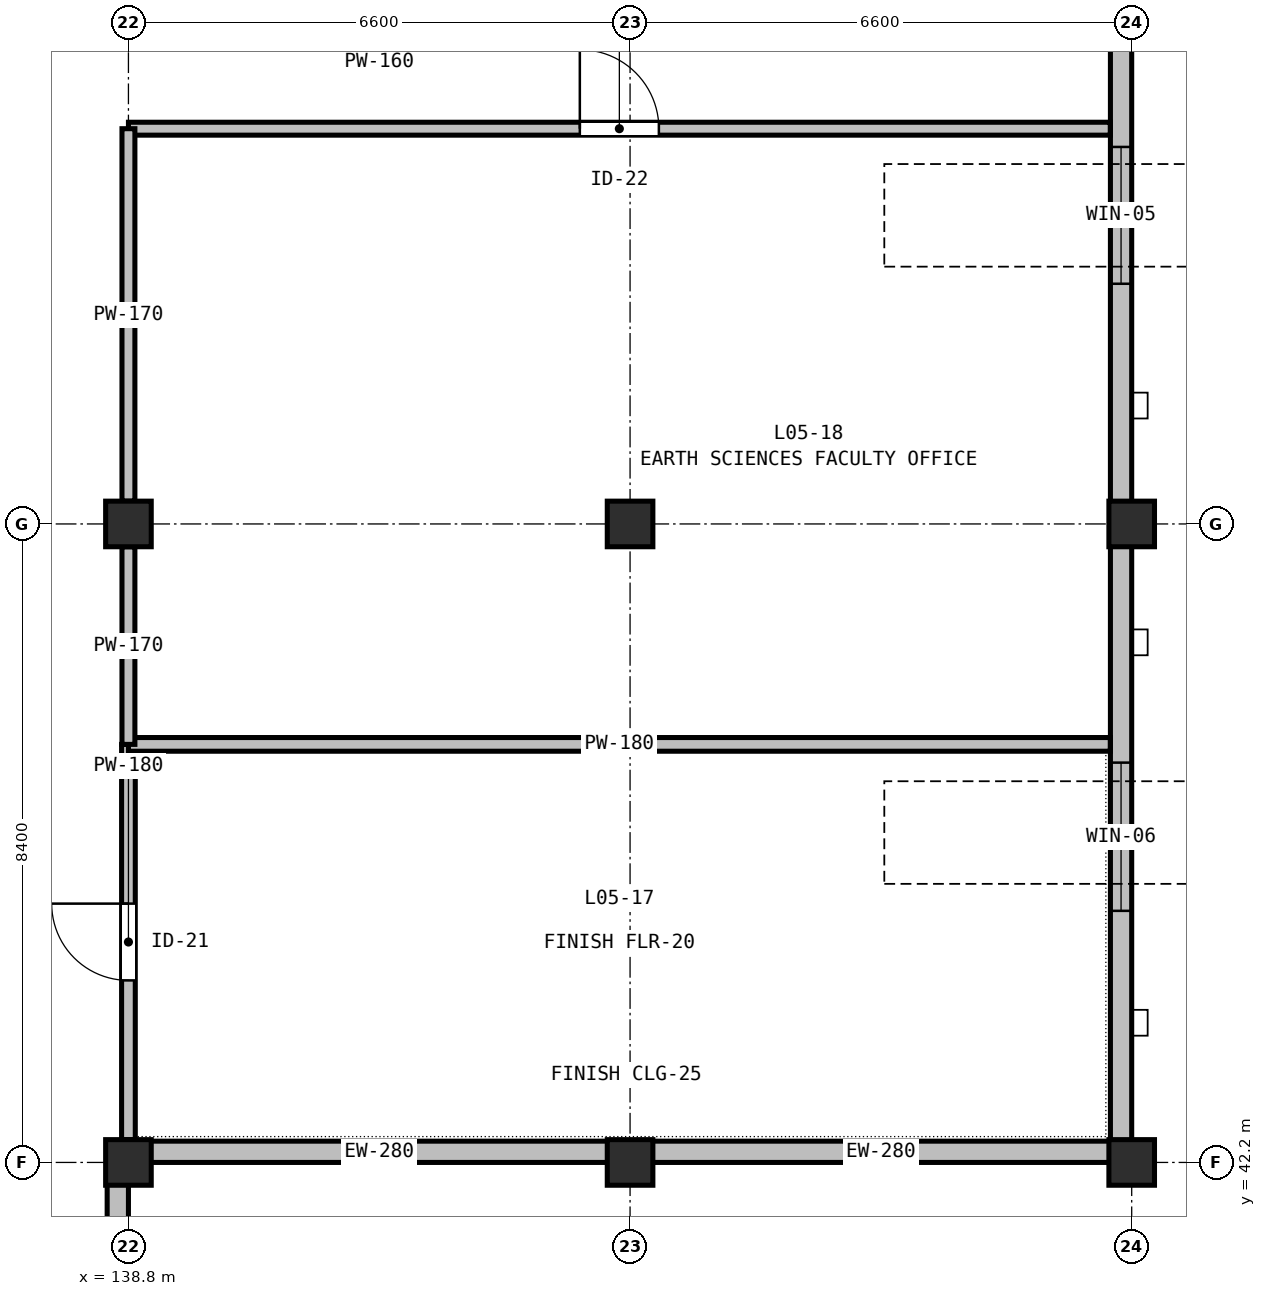
"""IFC4 building model, lengths in metres.
Left out: names, types, materials, properties, quantities, classifications, styles, units other than length and angle.
Written with IfcOpenShell. Run it as: python <this file> out.ifc"""

import sys

from ifc_helpers import new_model, si_unit, direction, frame, frame_2d, origin, origin_2d, place, context, subcontext, project, spatial, rectangle, extrude, element, fill, save


model = new_model("IFC4")
c1 = context("Model", 3, precision=1e-05, world=origin(), true_north=direction((0.0, 1.0)))
c2 = subcontext(c1, "Body", "Model", "MODEL_VIEW")
j1 = project(units=[si_unit("LENGTHUNIT", "METRE"), si_unit("PLANEANGLEUNIT", "RADIAN")], contexts=[c1])
p1 = place(None, origin())
s1 = spatial("IfcSite", under=j1, at=p1, CompositionType="ELEMENT")
p2 = place(p1, origin())
s2 = spatial("IfcBuilding", under=s1, at=p2, CompositionType="ELEMENT")
p3 = place(p2, frame((0.0, 0.0, 24.0)))
s3 = spatial("IfcBuildingStorey", under=s2, at=p3, CompositionType="ELEMENT", Elevation=24.0)
for number, where, z_axis, x_axis in (
    (1, (138.8, 42.2, 0.0), (0.0, 0.0, 1.0), (1.0, 0.0, 0.0)),
    (2, (138.8, 50.6, 0.0), (0.0, 0.0, 1.0), (1.0, 0.0, 0.0)),
    (3, (145.4, 42.2, 0.0), (0.0, 0.0, 1.0), (1.0, 0.0, 0.0)),
    (4, (145.4, 50.6, 0.0), (0.0, 0.0, 1.0), (1.0, 0.0, 0.0)),
    (5, (152.0, 42.2, 0.0), (0.0, 0.0, 1.0), (1.0, 0.0, 0.0)),
    (6, (152.0, 50.6, 0.0), (0.0, 0.0, 1.0), (1.0, 0.0, 0.0)),
):
    element("IfcColumn", number, at=place(p3, frame(where, z_axis=z_axis, x_axis=x_axis)), inside=s3, PredefinedType="COLUMN", context=c2, shape_type="SweptSolid", body=[
        extrude(rectangle(XDim=0.6, YDim=0.6, at=origin_2d()), origin(), (0.0, 0.0, 1.0), 4.5),
    ])
p4 = place(p3, frame((151.86, 58.72, 0.0), z_axis=(0.0, 0.0, 1.0), x_axis=(0.0, -1.0, 0.0)))
e7 = element("IfcWall", 7, at=p4, inside=s3, PredefinedType="STANDARD", context=c2, shape_type="SweptSolid", body=[
    extrude(rectangle(XDim=8.12, YDim=0.28, at=frame_2d((4.06, 0.0))), origin(), (0.0, 0.0, 1.0), 3.885),
])
p5 = place(p4, frame((3.16, 0.0, 0.9)))
e8 = element("IfcOpeningElement", 8, at=p5, cuts=e7, PredefinedType="OPENING", context=c2, shape_type="SweptSolid", body=[
    extrude(rectangle(XDim=1.8, YDim=2.1, at=frame_2d((0.9, 1.05))), frame((0.0, 0.15, 0.0), z_axis=(0.0, -1.0, 0.0), x_axis=(1.0, 0.0, 0.0)), (0.0, 0.0, 1.0), 0.3),
])
p6 = place(p3, frame((151.86, 50.6, 0.0), z_axis=(0.0, 0.0, 1.0), x_axis=(0.0, -1.0, 0.0)))
e9 = element("IfcWall", 9, at=p6, inside=s3, PredefinedType="STANDARD", context=c2, shape_type="SweptSolid", body=[
    extrude(rectangle(XDim=8.12, YDim=0.28, at=frame_2d((4.06, 0.0))), origin(), (0.0, 0.0, 1.0), 3.885),
])
p7 = place(p6, frame((3.14, 0.0, 0.9)))
e10 = element("IfcOpeningElement", 10, at=p7, cuts=e9, PredefinedType="OPENING", context=c2, shape_type="SweptSolid", body=[
    extrude(rectangle(XDim=1.95, YDim=2.1, at=frame_2d((0.975, 1.05))), frame((0.0, 0.15, 0.0), z_axis=(0.0, -1.0, 0.0), x_axis=(1.0, 0.0, 0.0)), (0.0, 0.0, 1.0), 0.3),
])
p8 = place(p3, frame((152.0, 42.34, 0.0), z_axis=(0.0, 0.0, 1.0), x_axis=(-1.0, 0.0, 0.0)))
e11 = element("IfcWall", 11, at=p8, inside=s3, PredefinedType="STANDARD", context=c2, shape_type="SweptSolid", body=[
    extrude(rectangle(XDim=6.6, YDim=0.28, at=frame_2d((3.3, 0.0))), origin(), (0.0, 0.0, 1.0), 3.735),
])
p9 = place(p3, frame((145.4, 42.34, 0.0), z_axis=(0.0, 0.0, 1.0), x_axis=(-1.0, 0.0, 0.0)))
e12 = element("IfcWall", 12, at=p9, inside=s3, PredefinedType="STANDARD", context=c2, shape_type="SweptSolid", body=[
    extrude(rectangle(XDim=6.6, YDim=0.28, at=frame_2d((3.3, 0.0))), origin(), (0.0, 0.0, 1.0), 3.735),
])
p10 = place(p3, frame((138.66, 41.92, 0.0), z_axis=(0.0, 0.0, 1.0), x_axis=(0.0, -1.0, 0.0)))
e13 = element("IfcWall", 13, at=p10, inside=s3, PredefinedType="STANDARD", context=c2, shape_type="SweptSolid", body=[
    extrude(rectangle(XDim=7.84, YDim=0.28, at=frame_2d((3.92, 0.0))), origin(), (0.0, 0.0, 1.0), 3.885),
])
p11 = place(p10, frame((0.917, 0.0, 0.9)))
e14 = element("IfcOpeningElement", 14, at=p11, cuts=e13, PredefinedType="OPENING", context=c2, shape_type="SweptSolid", body=[
    extrude(rectangle(XDim=2.4, YDim=2.1, at=frame_2d((1.2, 1.05))), frame((0.0, 0.15, 0.0), z_axis=(0.0, -1.0, 0.0), x_axis=(1.0, 0.0, 0.0)), (0.0, 0.0, 1.0), 0.3),
])
p12 = place(p10, frame((4.523, 0.0, 0.9)))
e15 = element("IfcOpeningElement", 15, at=p12, cuts=e13, PredefinedType="OPENING", context=c2, shape_type="SweptSolid", body=[
    extrude(rectangle(XDim=2.4, YDim=2.1, at=frame_2d((1.2, 1.05))), frame((0.0, 0.15, 0.0), z_axis=(0.0, -1.0, 0.0), x_axis=(1.0, 0.0, 0.0)), (0.0, 0.0, 1.0), 0.3),
])
p13 = place(p3, frame((138.8, 42.5, 0.0), z_axis=(0.0, 0.0, 1.0), x_axis=(0.0, 1.0, 0.0)))
e16 = element("IfcWall", 16, at=p13, inside=s3, PredefinedType="PARTITIONING", context=c2, shape_type="SweptSolid", body=[
    extrude(rectangle(XDim=5.2, YDim=0.18, at=frame_2d((2.6, 0.0))), origin(), (0.0, 0.0, 1.0), 3.735),
])
p14 = place(p13, frame((2.095, 0.0, 0.0)))
e17 = element("IfcOpeningElement", 17, at=p14, cuts=e16, PredefinedType="OPENING", context=c2, shape_type="SweptSolid", body=[
    extrude(rectangle(XDim=1.01, YDim=2.14, at=frame_2d((0.505, 1.07))), frame((0.0, 0.1, 0.0), z_axis=(0.0, -1.0, 0.0), x_axis=(1.0, 0.0, 0.0)), (0.0, 0.0, 1.0), 0.2),
])
p15 = place(p3, frame((138.8, 47.7, 0.0), z_axis=(0.0, 0.0, 1.0), x_axis=(1.0, 0.0, 0.0)))
e18 = element("IfcWall", 18, at=p15, inside=s3, PredefinedType="PARTITIONING", context=c2, shape_type="SweptSolid", body=[
    extrude(rectangle(XDim=12.918, YDim=0.18, at=frame_2d((6.459, 0.0))), origin(), (0.0, 0.0, 1.0), 3.735),
])
p16 = place(p3, frame((138.8, 55.8, 0.0), z_axis=(0.0, 0.0, 1.0), x_axis=(1.0, 0.0, 0.0)))
e19 = element("IfcWall", 19, at=p16, inside=s3, PredefinedType="PARTITIONING", context=c2, shape_type="SweptSolid", body=[
    extrude(rectangle(XDim=12.918, YDim=0.17, at=frame_2d((6.459, 0.0))), origin(), (0.0, 0.0, 1.0), 3.735),
])
p17 = place(p16, frame((5.939, 0.0, 0.0)))
e20 = element("IfcOpeningElement", 20, at=p17, cuts=e19, PredefinedType="OPENING", context=c2, shape_type="SweptSolid", body=[
    extrude(rectangle(XDim=1.04, YDim=2.14, at=frame_2d((0.52, 1.07))), frame((0.0, 0.095, 0.0), z_axis=(0.0, -1.0, 0.0), x_axis=(1.0, 0.0, 0.0)), (0.0, 0.0, 1.0), 0.19),
])
p18 = place(p3, frame((138.8, 47.7, 0.0), z_axis=(0.0, 0.0, 1.0), x_axis=(0.0, 1.0, 0.0)))
e21 = element("IfcWall", 21, at=p18, inside=s3, PredefinedType="PARTITIONING", context=c2, shape_type="SweptSolid", body=[
    extrude(rectangle(XDim=2.6, YDim=0.17, at=frame_2d((1.3, 0.0))), origin(), (0.0, 0.0, 1.0), 3.735),
])
p19 = place(p3, frame((138.8, 50.9, 0.0), z_axis=(0.0, 0.0, 1.0), x_axis=(0.0, 1.0, 0.0)))
e22 = element("IfcWall", 22, at=p19, inside=s3, PredefinedType="PARTITIONING", context=c2, shape_type="SweptSolid", body=[
    extrude(rectangle(XDim=4.9, YDim=0.17, at=frame_2d((2.45, 0.0))), origin(), (0.0, 0.0, 1.0), 3.735),
])
p20 = place(p5, origin())
e23 = element("IfcWindow", 23, at=p20, inside=s3, PartitioningType="SINGLE_PANEL", PredefinedType="WINDOW", context=c2, shape_type="SweptSolid", body=[
    extrude(rectangle(XDim=1.8, YDim=2.1, at=frame_2d((0.9, 1.05))), frame((0.0, 0.03, 0.0), z_axis=(0.0, -1.0, 0.0), x_axis=(1.0, 0.0, 0.0)), (0.0, 0.0, 1.0), 0.06),
])
fill(e8, e23)
p21 = place(p7, origin())
e24 = element("IfcWindow", 24, at=p21, inside=s3, PartitioningType="SINGLE_PANEL", PredefinedType="WINDOW", context=c2, shape_type="SweptSolid", body=[
    extrude(rectangle(XDim=1.95, YDim=2.1, at=frame_2d((0.975, 1.05))), frame((0.0, 0.03, 0.0), z_axis=(0.0, -1.0, 0.0), x_axis=(1.0, 0.0, 0.0)), (0.0, 0.0, 1.0), 0.06),
])
fill(e10, e24)
p22 = place(p14, origin())
e25 = element("IfcDoor", 25, at=p22, inside=s3, OperationType="SINGLE_SWING_RIGHT", PredefinedType="DOOR", context=c2, shape_type="SweptSolid", body=[
    extrude(rectangle(XDim=1.01, YDim=2.14, at=frame_2d((0.505, 1.07))), frame((0.0, 0.025, 0.0), z_axis=(0.0, -1.0, 0.0), x_axis=(1.0, 0.0, 0.0)), (0.0, 0.0, 1.0), 0.05),
])
fill(e17, e25)
p23 = place(p17, origin())
e26 = element("IfcDoor", 26, at=p23, inside=s3, OperationType="SINGLE_SWING_LEFT", PredefinedType="DOOR", context=c2, shape_type="SweptSolid", body=[
    extrude(rectangle(XDim=1.04, YDim=2.14, at=frame_2d((0.52, 1.07))), frame((0.0, 0.025, 0.0), z_axis=(0.0, -1.0, 0.0), x_axis=(1.0, 0.0, 0.0)), (0.0, 0.0, 1.0), 0.05),
])
fill(e20, e26)
save(model, sys.argv[1])
